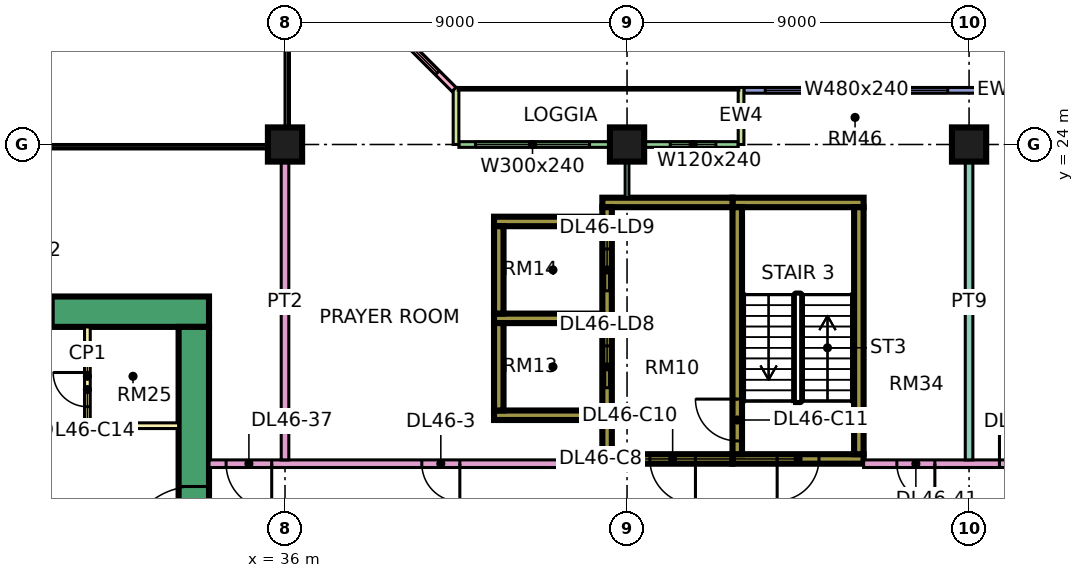
"""IFC4 building model, lengths in metres.
Left out: names, types, materials, properties, quantities, classifications, styles, units other than length and angle.
Written with IfcOpenShell. Run it as: python <this file> out.ifc"""

import sys

from ifc_helpers import new_model, si_unit, direction, frame, frame_2d, origin, origin_2d, place, context, subcontext, project, spatial, rectangle, extrude, element, fill, save


model = new_model("IFC4")
c1 = context("Model", 3, precision=1e-05, world=origin(), true_north=direction((0.0, 1.0)))
c2 = subcontext(c1, "Body", "Model", "MODEL_VIEW")
j1 = project(units=[si_unit("LENGTHUNIT", "METRE"), si_unit("PLANEANGLEUNIT", "RADIAN")], contexts=[c1])
p1 = place(None, origin())
s1 = spatial("IfcSite", under=j1, at=p1, CompositionType="ELEMENT")
p2 = place(p1, origin())
s2 = spatial("IfcBuilding", under=s1, at=p2, CompositionType="ELEMENT")
p3 = place(p2, frame((0.0, 0.0, 198.65)))
s3 = spatial("IfcBuildingStorey", under=s2, at=p3, CompositionType="ELEMENT", Elevation=198.65)
for number, where, z_axis, x_axis in (
    (1, (36.0, 24.0, 0.0), (0.0, 0.0, 1.0), (1.0, 0.0, 0.0)),
    (2, (45.0, 24.0, 0.0), (0.0, 0.0, 1.0), (1.0, 0.0, 0.0)),
    (3, (54.0, 24.0, 0.0), (0.0, 0.0, 1.0), (1.0, 0.0, 0.0)),
):
    element("IfcColumn", number, at=place(p3, frame(where, z_axis=z_axis, x_axis=x_axis)), inside=s3, PredefinedType="COLUMN", context=c2, shape_type="SweptSolid", body=[
        extrude(rectangle(XDim=0.9, YDim=0.9, at=origin_2d()), origin(), (0.0, 0.0, 1.0), 3.75),
    ])
p4 = place(p3, frame((9.0, 19.6, 0.0), z_axis=(0.0, 0.0, 1.0), x_axis=(1.0, 0.0, 0.0)))
e4 = element("IfcWall", 4, at=p4, inside=s3, PredefinedType="SHEAR", context=c2, shape_type="SweptSolid", body=[
    extrude(rectangle(XDim=25.0, YDim=0.8, at=frame_2d((12.5, 0.0))), origin(), (0.0, 0.0, 1.0), 3.75),
])
p5 = place(p4, frame((19.1, 0.0, 0.0)))
e5 = element("IfcOpeningElement", 5, at=p5, cuts=e4, PredefinedType="OPENING", context=c2, shape_type="SweptSolid", body=[
    extrude(rectangle(XDim=1.8, YDim=2.4, at=frame_2d((0.9, 1.2))), frame((0.0, 0.41, 0.0), z_axis=(0.0, -1.0, 0.0), x_axis=(1.0, 0.0, 0.0)), (0.0, 0.0, 1.0), 0.82),
])
p6 = place(p3, frame((33.6, 7.8, 0.0), z_axis=(0.0, 0.0, 1.0), x_axis=(0.0, 1.0, 0.0)))
e6 = element("IfcWall", 6, at=p6, inside=s3, PredefinedType="SHEAR", context=c2, shape_type="SweptSolid", body=[
    extrude(rectangle(XDim=11.4, YDim=0.8, at=frame_2d((5.7, 0.0))), origin(), (0.0, 0.0, 1.0), 3.75),
])
p7 = place(p6, frame((5.4, 0.0, 0.0)))
e7 = element("IfcOpeningElement", 7, at=p7, cuts=e6, PredefinedType="OPENING", context=c2, shape_type="SweptSolid", body=[
    extrude(rectangle(XDim=1.8, YDim=2.4, at=frame_2d((0.9, 1.2))), frame((0.0, 0.41, 0.0), z_axis=(0.0, -1.0, 0.0), x_axis=(1.0, 0.0, 0.0)), (0.0, 0.0, 1.0), 0.82),
])
p8 = place(p3, frame((47.775, 15.725, 0.0), z_axis=(0.0, 0.0, 1.0), x_axis=(1.0, 0.0, 0.0)))
e8 = element("IfcWall", 8, at=p8, inside=s3, PredefinedType="SHEAR", context=c2, shape_type="SweptSolid", body=[
    extrude(rectangle(XDim=3.45, YDim=0.25, at=frame_2d((1.725, 0.0))), origin(), (0.0, 0.0, 1.0), 3.75),
])
p9 = place(p8, frame((1.175, 0.0, 0.0)))
e9 = element("IfcOpeningElement", 9, at=p9, cuts=e8, PredefinedType="OPENING", context=c2, shape_type="SweptSolid", body=[
    extrude(rectangle(XDim=1.1, YDim=2.2, at=frame_2d((0.55, 1.1))), frame((0.0, 0.135, 0.0), z_axis=(0.0, -1.0, 0.0), x_axis=(1.0, 0.0, 0.0)), (0.0, 0.0, 1.0), 0.27),
])
p10 = place(p3, frame((47.775, 22.475, 0.0), z_axis=(0.0, 0.0, 1.0), x_axis=(1.0, 0.0, 0.0)))
e10 = element("IfcWall", 10, at=p10, inside=s3, PredefinedType="SHEAR", context=c2, shape_type="SweptSolid", body=[
    extrude(rectangle(XDim=3.45, YDim=0.25, at=frame_2d((1.725, 0.0))), origin(), (0.0, 0.0, 1.0), 3.75),
])
p11 = place(p3, frame((47.9, 15.85, 0.0), z_axis=(0.0, 0.0, 1.0), x_axis=(0.0, 1.0, 0.0)))
e11 = element("IfcWall", 11, at=p11, inside=s3, PredefinedType="SHEAR", context=c2, shape_type="SweptSolid", body=[
    extrude(rectangle(XDim=6.5, YDim=0.25, at=frame_2d((3.25, 0.0))), origin(), (0.0, 0.0, 1.0), 3.75),
])
p12 = place(p11, frame((0.35, 0.0, 0.0)))
e12 = element("IfcOpeningElement", 12, at=p12, cuts=e11, PredefinedType="OPENING", context=c2, shape_type="SweptSolid", body=[
    extrude(rectangle(XDim=1.1, YDim=2.2, at=frame_2d((0.55, 1.1))), frame((0.0, 0.135, 0.0), z_axis=(0.0, -1.0, 0.0), x_axis=(1.0, 0.0, 0.0)), (0.0, 0.0, 1.0), 0.27),
])
p13 = place(p3, frame((51.1, 15.85, 0.0), z_axis=(0.0, 0.0, 1.0), x_axis=(0.0, 1.0, 0.0)))
e13 = element("IfcWall", 13, at=p13, inside=s3, PredefinedType="SHEAR", context=c2, shape_type="SweptSolid", body=[
    extrude(rectangle(XDim=6.5, YDim=0.25, at=frame_2d((3.25, 0.0))), origin(), (0.0, 0.0, 1.0), 3.75),
])
p14 = place(p3, frame((44.35, 15.725, 0.0), z_axis=(0.0, 0.0, 1.0), x_axis=(1.0, 0.0, 0.0)))
e14 = element("IfcWall", 14, at=p14, inside=s3, PredefinedType="SHEAR", context=c2, shape_type="SweptSolid", body=[
    extrude(rectangle(XDim=3.425, YDim=0.25, at=frame_2d((1.712, 0.0))), origin(), (0.0, 0.0, 1.0), 3.75),
])
p15 = place(p14, frame((1.25, 0.0, 0.0)))
e15 = element("IfcOpeningElement", 15, at=p15, cuts=e14, PredefinedType="OPENING", context=c2, shape_type="SweptSolid", body=[
    extrude(rectangle(XDim=1.2, YDim=2.2, at=frame_2d((0.6, 1.1))), frame((0.0, 0.135, 0.0), z_axis=(0.0, -1.0, 0.0), x_axis=(1.0, 0.0, 0.0)), (0.0, 0.0, 1.0), 0.27),
])
p16 = place(p3, frame((44.35, 22.475, 0.0), z_axis=(0.0, 0.0, 1.0), x_axis=(1.0, 0.0, 0.0)))
e16 = element("IfcWall", 16, at=p16, inside=s3, PredefinedType="SHEAR", context=c2, shape_type="SweptSolid", body=[
    extrude(rectangle(XDim=3.425, YDim=0.25, at=frame_2d((1.712, 0.0))), origin(), (0.0, 0.0, 1.0), 3.75),
])
p17 = place(p3, frame((44.475, 15.85, 0.0), z_axis=(0.0, 0.0, 1.0), x_axis=(0.0, 1.0, 0.0)))
e17 = element("IfcWall", 17, at=p17, inside=s3, PredefinedType="SHEAR", context=c2, shape_type="SweptSolid", body=[
    extrude(rectangle(XDim=6.5, YDim=0.25, at=frame_2d((3.25, 0.0))), origin(), (0.0, 0.0, 1.0), 3.75),
])
p18 = place(p17, frame((1.75, 0.0, 0.0)))
e18 = element("IfcOpeningElement", 18, at=p18, cuts=e17, PredefinedType="OPENING", context=c2, shape_type="SweptSolid", body=[
    extrude(rectangle(XDim=1.1, YDim=2.2, at=frame_2d((0.55, 1.1))), frame((0.0, 0.135, 0.0), z_axis=(0.0, -1.0, 0.0), x_axis=(1.0, 0.0, 0.0)), (0.0, 0.0, 1.0), 0.27),
])
p19 = place(p17, frame((4.3, 0.0, 0.0)))
e19 = element("IfcOpeningElement", 19, at=p19, cuts=e17, PredefinedType="OPENING", context=c2, shape_type="SweptSolid", body=[
    extrude(rectangle(XDim=1.1, YDim=2.2, at=frame_2d((0.55, 1.1))), frame((0.0, 0.135, 0.0), z_axis=(0.0, -1.0, 0.0), x_axis=(1.0, 0.0, 0.0)), (0.0, 0.0, 1.0), 0.27),
])
for number, where, z_axis, x_axis in (
    (20, (41.5, 16.875, 0.0), (0.0, 0.0, 1.0), (1.0, 0.0, 0.0)),
    (21, (41.5, 19.425, 0.0), (0.0, 0.0, 1.0), (1.0, 0.0, 0.0)),
    (22, (41.5, 21.975, 0.0), (0.0, 0.0, 1.0), (1.0, 0.0, 0.0)),
):
    element("IfcWall", number, at=place(p3, frame(where, z_axis=z_axis, x_axis=x_axis)), inside=s3, PredefinedType="SHEAR", context=c2, shape_type="SweptSolid", body=[
        extrude(rectangle(XDim=2.85, YDim=0.25, at=frame_2d((1.425, 0.0))), origin(), (0.0, 0.0, 1.0), 3.75),
    ])
for number, where, z_axis, x_axis in (
    (23, (41.625, 17.0, 0.0), (0.0, 0.0, 1.0), (0.0, 1.0, 0.0)),
    (24, (41.625, 19.55, 0.0), (0.0, 0.0, 1.0), (0.0, 1.0, 0.0)),
):
    element("IfcWall", number, at=place(p3, frame(where, z_axis=z_axis, x_axis=x_axis)), inside=s3, PredefinedType="SHEAR", context=c2, shape_type="SweptSolid", body=[
        extrude(rectangle(XDim=2.3, YDim=0.25, at=frame_2d((1.15, 0.0))), origin(), (0.0, 0.0, 1.0), 3.75),
    ])
p20 = place(p3, frame((61.5, 25.425, 0.0), z_axis=(0.0, 0.0, 1.0), x_axis=(-1.0, 0.0, 0.0)))
e25 = element("IfcWall", 25, at=p20, inside=s3, PredefinedType="SOLIDWALL", context=c2, shape_type="SweptSolid", body=[
    extrude(rectangle(XDim=13.425, YDim=0.15, at=frame_2d((6.712, 0.0))), origin(), (0.0, 0.0, 1.0), 3.35),
])
p21 = place(p20, frame((0.3, 0.0, 0.45)))
e26 = element("IfcOpeningElement", 26, at=p21, cuts=e25, PredefinedType="OPENING", context=c2, shape_type="SweptSolid", body=[
    extrude(rectangle(XDim=0.9, YDim=2.4, at=frame_2d((0.45, 1.2))), frame((0.0, 0.085, 0.0), z_axis=(0.0, -1.0, 0.0), x_axis=(1.0, 0.0, 0.0)), (0.0, 0.0, 1.0), 0.17),
])
p22 = place(p20, frame((3.0, 0.0, 0.45)))
e27 = element("IfcOpeningElement", 27, at=p22, cuts=e25, PredefinedType="OPENING", context=c2, shape_type="SweptSolid", body=[
    extrude(rectangle(XDim=3.0, YDim=2.4, at=frame_2d((1.5, 1.2))), frame((0.0, 0.085, 0.0), z_axis=(0.0, -1.0, 0.0), x_axis=(1.0, 0.0, 0.0)), (0.0, 0.0, 1.0), 0.17),
])
p23 = place(p20, frame((8.062, 0.0, 0.45)))
e28 = element("IfcOpeningElement", 28, at=p23, cuts=e25, PredefinedType="OPENING", context=c2, shape_type="SweptSolid", body=[
    extrude(rectangle(XDim=4.8, YDim=2.4, at=frame_2d((2.4, 1.2))), frame((0.0, 0.085, 0.0), z_axis=(0.0, -1.0, 0.0), x_axis=(1.0, 0.0, 0.0)), (0.0, 0.0, 1.0), 0.17),
])
p24 = place(p3, frame((47.925, 24.0, 0.0), z_axis=(0.0, 0.0, 1.0), x_axis=(-1.0, 0.0, 0.0)))
e29 = element("IfcWall", 29, at=p24, inside=s3, PredefinedType="SOLIDWALL", context=c2, shape_type="SweptSolid", body=[
    extrude(rectangle(XDim=7.35, YDim=0.15, at=frame_2d((3.675, 0.0))), origin(), (0.0, 0.0, 1.0), 3.35),
])
p25 = place(p24, frame((0.587, 0.0, 0.45)))
e30 = element("IfcOpeningElement", 30, at=p25, cuts=e29, PredefinedType="OPENING", context=c2, shape_type="SweptSolid", body=[
    extrude(rectangle(XDim=1.2, YDim=2.4, at=frame_2d((0.6, 1.2))), frame((0.0, 0.085, 0.0), z_axis=(0.0, -1.0, 0.0), x_axis=(1.0, 0.0, 0.0)), (0.0, 0.0, 1.0), 0.17),
])
p26 = place(p24, frame((3.913, 0.0, 0.45)))
e31 = element("IfcOpeningElement", 31, at=p26, cuts=e29, PredefinedType="OPENING", context=c2, shape_type="SweptSolid", body=[
    extrude(rectangle(XDim=3.0, YDim=2.4, at=frame_2d((1.5, 1.2))), frame((0.0, 0.085, 0.0), z_axis=(0.0, -1.0, 0.0), x_axis=(1.0, 0.0, 0.0)), (0.0, 0.0, 1.0), 0.17),
])
for number, where, z_axis, x_axis in (
    (32, (48.0, 25.5, 0.0), (0.0, 0.0, 1.0), (0.0, -1.0, 0.0)),
    (33, (40.5, 25.5, 0.0), (0.0, 0.0, 1.0), (0.0, -1.0, 0.0)),
):
    element("IfcWall", number, at=place(p3, frame(where, z_axis=z_axis, x_axis=x_axis)), inside=s3, PredefinedType="SOLIDWALL", context=c2, shape_type="SweptSolid", body=[
        extrude(rectangle(XDim=1.5, YDim=0.15, at=frame_2d((0.75, 0.0))), origin(), (0.0, 0.0, 1.0), 3.35),
    ])
p27 = place(p3, frame((40.447, 25.447, 0.0), z_axis=(0.0, 0.0, 1.0), x_axis=(-0.707106781187, 0.707106781187, 0.0)))
e34 = element("IfcWall", 34, at=p27, inside=s3, PredefinedType="SOLIDWALL", context=c2, shape_type="SweptSolid", body=[
    extrude(rectangle(XDim=4.243, YDim=0.15, at=frame_2d((2.121, 0.0))), origin(), (0.0, 0.0, 1.0), 3.35),
])
p28 = place(p27, frame((0.621, 0.0, 0.45)))
e35 = element("IfcOpeningElement", 35, at=p28, cuts=e34, PredefinedType="OPENING", context=c2, shape_type="SweptSolid", body=[
    extrude(rectangle(XDim=3.0, YDim=2.4, at=frame_2d((1.5, 1.2))), frame((0.0, 0.085, 0.0), z_axis=(0.0, -1.0, 0.0), x_axis=(1.0, 0.0, 0.0)), (0.0, 0.0, 1.0), 0.17),
])
p29 = place(p3, frame((30.8, 16.6, 0.0), z_axis=(0.0, 0.0, 1.0), x_axis=(0.0, 1.0, 0.0)))
e36 = element("IfcWall", 36, at=p29, inside=s3, PredefinedType="PARTITIONING", context=c2, shape_type="SweptSolid", body=[
    extrude(rectangle(XDim=2.6, YDim=0.15, at=frame_2d((1.3, 0.0))), origin(), (0.0, 0.0, 1.0), 3.35),
])
p30 = place(p29, frame((0.5, 0.0, 0.0)))
e37 = element("IfcOpeningElement", 37, at=p30, cuts=e36, PredefinedType="OPENING", context=c2, shape_type="SweptSolid", body=[
    extrude(rectangle(XDim=0.9, YDim=2.1, at=frame_2d((0.45, 1.05))), frame((0.0, 0.085, 0.0), z_axis=(0.0, -1.0, 0.0), x_axis=(1.0, 0.0, 0.0)), (0.0, 0.0, 1.0), 0.17),
])
p31 = place(p3, frame((30.8, 16.6, 0.0), z_axis=(0.0, 0.0, 1.0), x_axis=(1.0, 0.0, 0.0)))
e38 = element("IfcWall", 38, at=p31, inside=s3, PredefinedType="PARTITIONING", context=c2, shape_type="SweptSolid", body=[
    extrude(rectangle(XDim=2.4, YDim=0.15, at=frame_2d((1.2, 0.0))), origin(), (0.0, 0.0, 1.0), 3.35),
])
p32 = place(p3, frame((34.0, 15.6, 0.0), z_axis=(0.0, 0.0, 1.0), x_axis=(1.0, 0.0, 0.0)))
e39 = element("IfcWall", 39, at=p32, inside=s3, PredefinedType="PARTITIONING", context=c2, shape_type="SweptSolid", body=[
    extrude(rectangle(XDim=10.35, YDim=0.2, at=frame_2d((5.175, 0.0))), origin(), (0.0, 0.0, 1.0), 3.35),
])
p33 = place(p32, frame((5.6, 0.0, 0.0)))
e40 = element("IfcOpeningElement", 40, at=p33, cuts=e39, PredefinedType="OPENING", context=c2, shape_type="SweptSolid", body=[
    extrude(rectangle(XDim=1.0, YDim=2.1, at=frame_2d((0.5, 1.05))), frame((0.0, 0.11, 0.0), z_axis=(0.0, -1.0, 0.0), x_axis=(1.0, 0.0, 0.0)), (0.0, 0.0, 1.0), 0.22),
])
p34 = place(p32, frame((0.45, 0.0, 0.0)))
e41 = element("IfcOpeningElement", 41, at=p34, cuts=e39, PredefinedType="OPENING", context=c2, shape_type="SweptSolid", body=[
    extrude(rectangle(XDim=1.2, YDim=2.1, at=frame_2d((0.6, 1.05))), frame((0.0, 0.11, 0.0), z_axis=(0.0, -1.0, 0.0), x_axis=(1.0, 0.0, 0.0)), (0.0, 0.0, 1.0), 0.22),
])
p35 = place(p3, frame((36.0, 15.7, 0.0), z_axis=(0.0, 0.0, 1.0), x_axis=(0.0, 1.0, 0.0)))
e42 = element("IfcWall", 42, at=p35, inside=s3, PredefinedType="PARTITIONING", context=c2, shape_type="SweptSolid", body=[
    extrude(rectangle(XDim=8.3, YDim=0.2, at=frame_2d((4.15, 0.0))), origin(), (0.0, 0.0, 1.0), 3.35),
])
p36 = place(p3, frame((45.0, 22.6, 0.0), z_axis=(0.0, 0.0, 1.0), x_axis=(0.0, 1.0, 0.0)))
e43 = element("IfcWall", 43, at=p36, inside=s3, PredefinedType="PARTITIONING", context=c2, shape_type="SweptSolid", body=[
    extrude(rectangle(XDim=1.326, YDim=0.1, at=frame_2d((0.663, 0.0))), origin(), (0.0, 0.0, 1.0), 3.35),
])
p37 = place(p3, frame((51.225, 15.6, 0.0), z_axis=(0.0, 0.0, 1.0), x_axis=(1.0, 0.0, 0.0)))
e44 = element("IfcWall", 44, at=p37, inside=s3, PredefinedType="PARTITIONING", context=c2, shape_type="SweptSolid", body=[
    extrude(rectangle(XDim=11.701, YDim=0.2, at=frame_2d((5.851, 0.0))), origin(), (0.0, 0.0, 1.0), 3.35),
])
p38 = place(p37, frame((3.575, 0.0, 0.0)))
e45 = element("IfcOpeningElement", 45, at=p38, cuts=e44, PredefinedType="OPENING", context=c2, shape_type="SweptSolid", body=[
    extrude(rectangle(XDim=1.0, YDim=2.1, at=frame_2d((0.5, 1.05))), frame((0.0, 0.11, 0.0), z_axis=(0.0, -1.0, 0.0), x_axis=(1.0, 0.0, 0.0)), (0.0, 0.0, 1.0), 0.22),
])
p39 = place(p37, frame((0.875, 0.0, 0.0)))
e46 = element("IfcOpeningElement", 46, at=p39, cuts=e44, PredefinedType="OPENING", context=c2, shape_type="SweptSolid", body=[
    extrude(rectangle(XDim=1.0, YDim=2.1, at=frame_2d((0.5, 1.05))), frame((0.0, 0.11, 0.0), z_axis=(0.0, -1.0, 0.0), x_axis=(1.0, 0.0, 0.0)), (0.0, 0.0, 1.0), 0.22),
])
p40 = place(p3, frame((54.0, 15.7, 0.0), z_axis=(0.0, 0.0, 1.0), x_axis=(0.0, 1.0, 0.0)))
e47 = element("IfcWall", 47, at=p40, inside=s3, PredefinedType="PARTITIONING", context=c2, shape_type="SweptSolid", body=[
    extrude(rectangle(XDim=8.3, YDim=0.2, at=frame_2d((4.15, 0.0))), origin(), (0.0, 0.0, 1.0), 3.35),
])
p41 = place(p23, origin())
e48 = element("IfcWindow", 48, at=p41, inside=s3, PartitioningType="SINGLE_PANEL", PredefinedType="WINDOW", context=c2, shape_type="SweptSolid", body=[
    extrude(rectangle(XDim=4.8, YDim=2.4, at=frame_2d((2.4, 1.2))), frame((0.0, 0.03, 0.0), z_axis=(0.0, -1.0, 0.0), x_axis=(1.0, 0.0, 0.0)), (0.0, 0.0, 1.0), 0.06),
])
fill(e28, e48)
p42 = place(p25, origin())
e49 = element("IfcWindow", 49, at=p42, inside=s3, PartitioningType="SINGLE_PANEL", PredefinedType="WINDOW", context=c2, shape_type="SweptSolid", body=[
    extrude(rectangle(XDim=1.2, YDim=2.4, at=frame_2d((0.6, 1.2))), frame((0.0, 0.03, 0.0), z_axis=(0.0, -1.0, 0.0), x_axis=(1.0, 0.0, 0.0)), (0.0, 0.0, 1.0), 0.06),
])
fill(e30, e49)
p43 = place(p26, origin())
e50 = element("IfcWindow", 50, at=p43, inside=s3, PartitioningType="SINGLE_PANEL", PredefinedType="WINDOW", context=c2, shape_type="SweptSolid", body=[
    extrude(rectangle(XDim=3.0, YDim=2.4, at=frame_2d((1.5, 1.2))), frame((0.0, 0.03, 0.0), z_axis=(0.0, -1.0, 0.0), x_axis=(1.0, 0.0, 0.0)), (0.0, 0.0, 1.0), 0.06),
])
fill(e31, e50)
p44 = place(p28, origin())
e51 = element("IfcWindow", 51, at=p44, inside=s3, PartitioningType="SINGLE_PANEL", PredefinedType="WINDOW", context=c2, shape_type="SweptSolid", body=[
    extrude(rectangle(XDim=3.0, YDim=2.4, at=frame_2d((1.5, 1.2))), frame((0.0, 0.03, 0.0), z_axis=(0.0, -1.0, 0.0), x_axis=(1.0, 0.0, 0.0)), (0.0, 0.0, 1.0), 0.06),
])
fill(e35, e51)
p45 = place(p7, origin())
e52 = element("IfcDoor", 52, at=p45, inside=s3, OperationType="DOUBLE_DOOR_SINGLE_SWING", PredefinedType="DOOR", context=c2, shape_type="SweptSolid", body=[
    extrude(rectangle(XDim=1.8, YDim=2.4, at=frame_2d((0.9, 1.2))), frame((0.0, 0.025, 0.0), z_axis=(0.0, -1.0, 0.0), x_axis=(1.0, 0.0, 0.0)), (0.0, 0.0, 1.0), 0.05),
])
fill(e7, e52)
p46 = place(p5, frame((1.8, 0.0, 0.0), z_axis=(0.0, 0.0, 1.0), x_axis=(-1.0, 0.0, 0.0)))
e53 = element("IfcDoor", 53, at=p46, inside=s3, OperationType="DOUBLE_DOOR_SINGLE_SWING", PredefinedType="DOOR", context=c2, shape_type="SweptSolid", body=[
    extrude(rectangle(XDim=1.8, YDim=2.4, at=frame_2d((0.9, 1.2))), frame((0.0, 0.025, 0.0), z_axis=(0.0, -1.0, 0.0), x_axis=(1.0, 0.0, 0.0)), (0.0, 0.0, 1.0), 0.05),
])
fill(e5, e53)
p47 = place(p9, frame((1.1, 0.0, 0.0), z_axis=(0.0, 0.0, 1.0), x_axis=(-1.0, 0.0, 0.0)))
e54 = element("IfcDoor", 54, at=p47, inside=s3, OperationType="SINGLE_SWING_LEFT", PredefinedType="DOOR", context=c2, shape_type="SweptSolid", body=[
    extrude(rectangle(XDim=1.1, YDim=2.2, at=frame_2d((0.55, 1.1))), frame((0.0, 0.025, 0.0), z_axis=(0.0, -1.0, 0.0), x_axis=(1.0, 0.0, 0.0)), (0.0, 0.0, 1.0), 0.05),
])
fill(e9, e54)
p48 = place(p15, origin())
e55 = element("IfcDoor", 55, at=p48, inside=s3, OperationType="SINGLE_SWING_RIGHT", PredefinedType="DOOR", context=c2, shape_type="SweptSolid", body=[
    extrude(rectangle(XDim=1.2, YDim=2.2, at=frame_2d((0.6, 1.1))), frame((0.0, 0.025, 0.0), z_axis=(0.0, -1.0, 0.0), x_axis=(1.0, 0.0, 0.0)), (0.0, 0.0, 1.0), 0.05),
])
fill(e15, e55)
p49 = place(p12, frame((1.1, 0.0, 0.0), z_axis=(0.0, 0.0, 1.0), x_axis=(-1.0, 0.0, 0.0)))
e56 = element("IfcDoor", 56, at=p49, inside=s3, OperationType="SINGLE_SWING_RIGHT", PredefinedType="DOOR", context=c2, shape_type="SweptSolid", body=[
    extrude(rectangle(XDim=1.1, YDim=2.2, at=frame_2d((0.55, 1.1))), frame((0.0, 0.025, 0.0), z_axis=(0.0, -1.0, 0.0), x_axis=(1.0, 0.0, 0.0)), (0.0, 0.0, 1.0), 0.05),
])
fill(e12, e56)
p50 = place(p18, origin())
e57 = element("IfcDoor", 57, at=p50, inside=s3, OperationType="DOUBLE_DOOR_SLIDING", PredefinedType="DOOR", context=c2, shape_type="SweptSolid", body=[
    extrude(rectangle(XDim=1.1, YDim=2.2, at=frame_2d((0.55, 1.1))), frame((0.0, 0.025, 0.0), z_axis=(0.0, -1.0, 0.0), x_axis=(1.0, 0.0, 0.0)), (0.0, 0.0, 1.0), 0.05),
])
fill(e18, e57)
p51 = place(p19, origin())
e58 = element("IfcDoor", 58, at=p51, inside=s3, OperationType="DOUBLE_DOOR_SLIDING", PredefinedType="DOOR", context=c2, shape_type="SweptSolid", body=[
    extrude(rectangle(XDim=1.1, YDim=2.2, at=frame_2d((0.55, 1.1))), frame((0.0, 0.025, 0.0), z_axis=(0.0, -1.0, 0.0), x_axis=(1.0, 0.0, 0.0)), (0.0, 0.0, 1.0), 0.05),
])
fill(e19, e58)
p52 = place(p30, frame((0.9, 0.0, 0.0), z_axis=(0.0, 0.0, 1.0), x_axis=(-1.0, 0.0, 0.0)))
e59 = element("IfcDoor", 59, at=p52, inside=s3, OperationType="SINGLE_SWING_RIGHT", PredefinedType="DOOR", context=c2, shape_type="SweptSolid", body=[
    extrude(rectangle(XDim=0.9, YDim=2.1, at=frame_2d((0.45, 1.05))), frame((0.0, 0.025, 0.0), z_axis=(0.0, -1.0, 0.0), x_axis=(1.0, 0.0, 0.0)), (0.0, 0.0, 1.0), 0.05),
])
fill(e37, e59)
p53 = place(p33, origin())
e60 = element("IfcDoor", 60, at=p53, inside=s3, OperationType="SINGLE_SWING_RIGHT", PredefinedType="DOOR", context=c2, shape_type="SweptSolid", body=[
    extrude(rectangle(XDim=1.0, YDim=2.1, at=frame_2d((0.5, 1.05))), frame((0.0, 0.025, 0.0), z_axis=(0.0, -1.0, 0.0), x_axis=(1.0, 0.0, 0.0)), (0.0, 0.0, 1.0), 0.05),
])
fill(e40, e60)
p54 = place(p38, origin())
e61 = element("IfcDoor", 61, at=p54, inside=s3, OperationType="SINGLE_SWING_LEFT", PredefinedType="DOOR", context=c2, shape_type="SweptSolid", body=[
    extrude(rectangle(XDim=1.0, YDim=2.1, at=frame_2d((0.5, 1.05))), frame((0.0, 0.025, 0.0), z_axis=(0.0, -1.0, 0.0), x_axis=(1.0, 0.0, 0.0)), (0.0, 0.0, 1.0), 0.05),
])
fill(e45, e61)
p55 = place(p34, origin())
e62 = element("IfcDoor", 62, at=p55, inside=s3, OperationType="SINGLE_SWING_RIGHT", PredefinedType="DOOR", context=c2, shape_type="SweptSolid", body=[
    extrude(rectangle(XDim=1.2, YDim=2.1, at=frame_2d((0.6, 1.05))), frame((0.0, 0.025, 0.0), z_axis=(0.0, -1.0, 0.0), x_axis=(1.0, 0.0, 0.0)), (0.0, 0.0, 1.0), 0.05),
])
fill(e41, e62)
p56 = place(p39, origin())
e63 = element("IfcDoor", 63, at=p56, inside=s3, OperationType="SINGLE_SWING_RIGHT", PredefinedType="DOOR", context=c2, shape_type="SweptSolid", body=[
    extrude(rectangle(XDim=1.0, YDim=2.1, at=frame_2d((0.5, 1.05))), frame((0.0, 0.025, 0.0), z_axis=(0.0, -1.0, 0.0), x_axis=(1.0, 0.0, 0.0)), (0.0, 0.0, 1.0), 0.05),
])
fill(e46, e63)
save(model, sys.argv[1])
